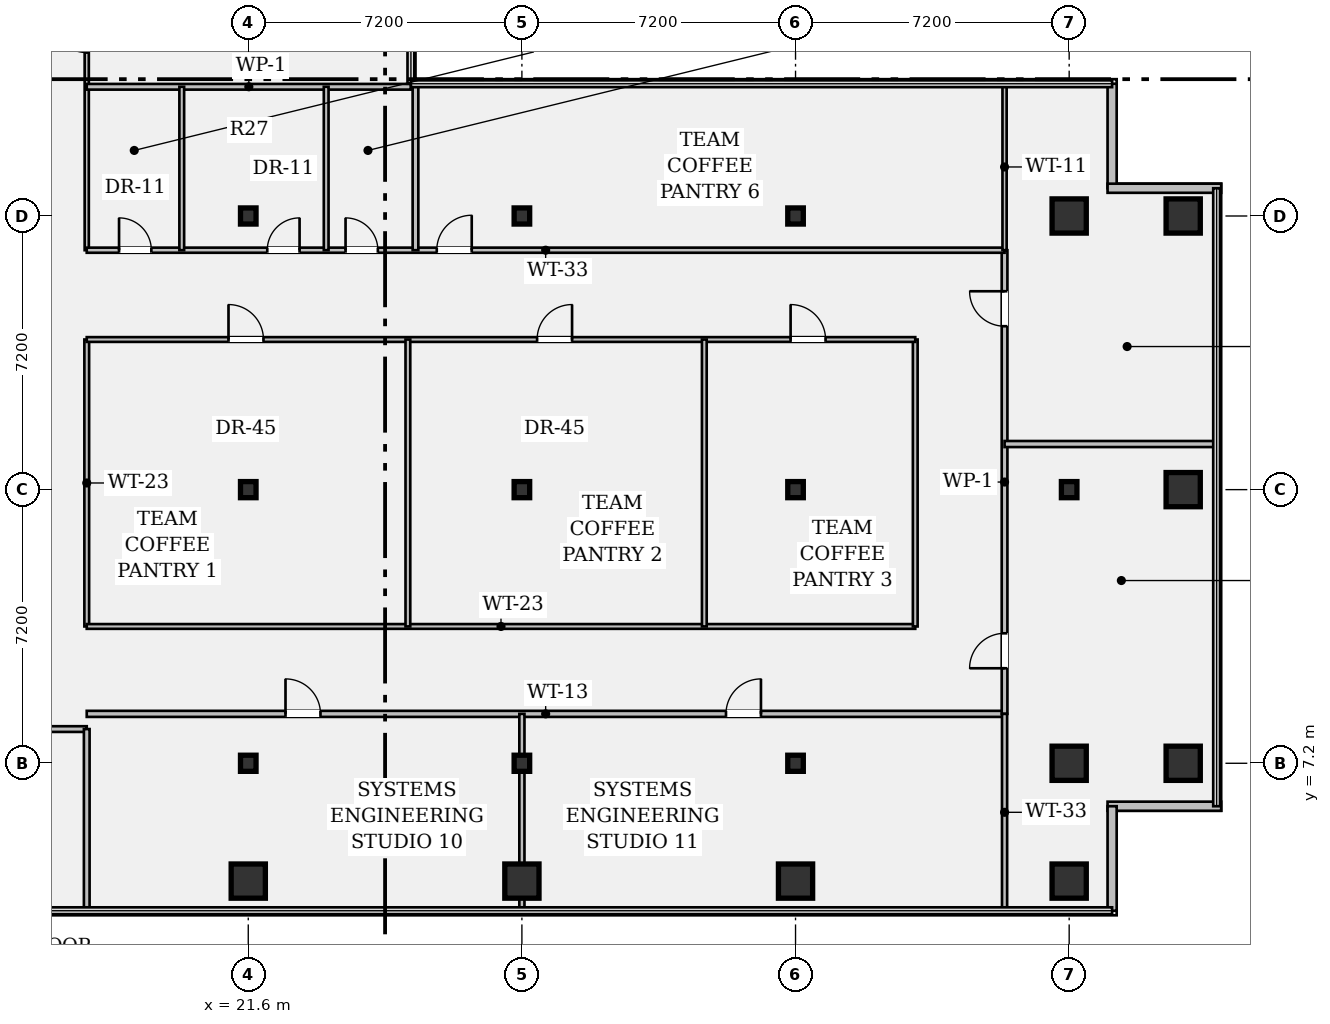
"""IFC4 building model, lengths in metres.
Left out: names, types, materials, properties, quantities, classifications, styles, units other than length and angle.
Written with IfcOpenShell. Run it as: python <this file> out.ifc"""

import sys

from ifc_helpers import new_model, si_unit, direction, frame, frame_2d, origin, origin_2d, place, context, subcontext, project, spatial, rectangle, hollow_rectangle, i_section, extrude, element, fill, save


model = new_model("IFC4")
c1 = context("Model", 3, precision=1e-05, world=origin(), true_north=direction((0.0, 1.0)))
c2 = subcontext(c1, "Body", "Model", "MODEL_VIEW")
j1 = project(units=[si_unit("LENGTHUNIT", "METRE"), si_unit("PLANEANGLEUNIT", "RADIAN")], contexts=[c1])
p1 = place(None, origin())
s1 = spatial("IfcSite", under=j1, at=p1, CompositionType="ELEMENT")
p2 = place(p1, origin())
s2 = spatial("IfcBuilding", under=s1, at=p2, CompositionType="ELEMENT")
p3 = place(p2, frame((0.0, 0.0, 125.3)))
s3 = spatial("IfcBuildingStorey", under=s2, at=p3, CompositionType="ELEMENT", Elevation=125.3)
p4 = place(p3, frame((21.6, 4.1, 0.0), z_axis=(0.0, 0.0, 1.0), x_axis=(1.0, 0.0, 0.0)))
e1 = element("IfcColumn", 1, at=p4, inside=s3, PredefinedType="COLUMN", context=c2, shape_type="SweptSolid", body=[
    extrude(hollow_rectangle(XDim=0.9, YDim=0.9, WallThickness=0.055, at=origin_2d()), origin(), (0.0, 0.0, 1.0), 3.58),
])
for number, where, z_axis, x_axis in (
    (2, (21.6, 7.2, 0.0), (0.0, 0.0, 1.0), (1.0, 0.0, 0.0)),
    (3, (21.6, 14.4, 0.0), (0.0, 0.0, 1.0), (1.0, 0.0, 0.0)),
    (4, (21.6, 21.6, 0.0), (0.0, 0.0, 1.0), (1.0, 0.0, 0.0)),
):
    element("IfcColumn", number, at=place(p3, frame(where, z_axis=z_axis, x_axis=x_axis)), inside=s3, PredefinedType="COLUMN", context=c2, shape_type="SweptSolid", body=[
        extrude(i_section(OverallWidth=0.409, OverallDepth=0.424, WebThickness=0.033, FlangeThickness=0.052, FilletRadius=0.018, at=origin_2d()), origin(), (0.0, 0.0, 1.0), 3.58),
    ])
p5 = place(p3, frame((28.8, 4.1, 0.0), z_axis=(0.0, 0.0, 1.0), x_axis=(1.0, 0.0, 0.0)))
e5 = element("IfcColumn", 5, at=p5, inside=s3, PredefinedType="COLUMN", context=c2, shape_type="SweptSolid", body=[
    extrude(hollow_rectangle(XDim=0.9, YDim=0.9, WallThickness=0.055, at=origin_2d()), origin(), (0.0, 0.0, 1.0), 3.58),
])
for number, where, z_axis, x_axis in (
    (6, (28.8, 7.2, 0.0), (0.0, 0.0, 1.0), (1.0, 0.0, 0.0)),
    (7, (28.8, 14.4, 0.0), (0.0, 0.0, 1.0), (1.0, 0.0, 0.0)),
    (8, (28.8, 21.6, 0.0), (0.0, 0.0, 1.0), (1.0, 0.0, 0.0)),
):
    element("IfcColumn", number, at=place(p3, frame(where, z_axis=z_axis, x_axis=x_axis)), inside=s3, PredefinedType="COLUMN", context=c2, shape_type="SweptSolid", body=[
        extrude(i_section(OverallWidth=0.409, OverallDepth=0.424, WebThickness=0.033, FlangeThickness=0.052, FilletRadius=0.018, at=origin_2d()), origin(), (0.0, 0.0, 1.0), 3.58),
    ])
p6 = place(p3, frame((36.0, 4.1, 0.0), z_axis=(0.0, 0.0, 1.0), x_axis=(1.0, 0.0, 0.0)))
e9 = element("IfcColumn", 9, at=p6, inside=s3, PredefinedType="COLUMN", context=c2, shape_type="SweptSolid", body=[
    extrude(hollow_rectangle(XDim=0.9, YDim=0.9, WallThickness=0.055, at=origin_2d()), origin(), (0.0, 0.0, 1.0), 3.58),
])
for number, where, z_axis, x_axis in (
    (10, (36.0, 7.2, 0.0), (0.0, 0.0, 1.0), (1.0, 0.0, 0.0)),
    (11, (36.0, 14.4, 0.0), (0.0, 0.0, 1.0), (1.0, 0.0, 0.0)),
    (12, (36.0, 21.6, 0.0), (0.0, 0.0, 1.0), (1.0, 0.0, 0.0)),
):
    element("IfcColumn", number, at=place(p3, frame(where, z_axis=z_axis, x_axis=x_axis)), inside=s3, PredefinedType="COLUMN", context=c2, shape_type="SweptSolid", body=[
        extrude(i_section(OverallWidth=0.409, OverallDepth=0.424, WebThickness=0.033, FlangeThickness=0.052, FilletRadius=0.018, at=origin_2d()), origin(), (0.0, 0.0, 1.0), 3.58),
    ])
for number, where, z_axis, x_axis in (
    (13, (43.2, 4.1, 0.0), (0.0, 0.0, 1.0), (1.0, 0.0, 0.0)),
    (14, (43.2, 7.2, 0.0), (0.0, 0.0, 1.0), (1.0, 0.0, 0.0)),
):
    element("IfcColumn", number, at=place(p3, frame(where, z_axis=z_axis, x_axis=x_axis)), inside=s3, PredefinedType="COLUMN", context=c2, shape_type="SweptSolid", body=[
        extrude(hollow_rectangle(XDim=0.9, YDim=0.9, WallThickness=0.055, at=origin_2d()), origin(), (0.0, 0.0, 1.0), 3.58),
    ])
p7 = place(p3, frame((43.2, 14.4, 0.0), z_axis=(0.0, 0.0, 1.0), x_axis=(1.0, 0.0, 0.0)))
e15 = element("IfcColumn", 15, at=p7, inside=s3, PredefinedType="COLUMN", context=c2, shape_type="SweptSolid", body=[
    extrude(i_section(OverallWidth=0.409, OverallDepth=0.424, WebThickness=0.033, FlangeThickness=0.052, FilletRadius=0.018, at=origin_2d()), origin(), (0.0, 0.0, 1.0), 3.58),
])
for number, where, z_axis, x_axis in (
    (16, (43.2, 21.6, 0.0), (0.0, 0.0, 1.0), (1.0, 0.0, 0.0)),
    (17, (46.2, 7.2, 0.0), (0.0, 0.0, 1.0), (1.0, 0.0, 0.0)),
    (18, (46.2, 14.4, 0.0), (0.0, 0.0, 1.0), (1.0, 0.0, 0.0)),
    (19, (46.2, 21.6, 0.0), (0.0, 0.0, 1.0), (1.0, 0.0, 0.0)),
):
    element("IfcColumn", number, at=place(p3, frame(where, z_axis=z_axis, x_axis=x_axis)), inside=s3, PredefinedType="COLUMN", context=c2, shape_type="SweptSolid", body=[
        extrude(hollow_rectangle(XDim=0.9, YDim=0.9, WallThickness=0.055, at=origin_2d()), origin(), (0.0, 0.0, 1.0), 3.58),
    ])
p8 = place(p3, frame((44.33, 25.08, 0.0), z_axis=(0.0, 0.0, 1.0), x_axis=(0.0, -1.0, 0.0)))
e20 = element("IfcWall", 20, at=p8, inside=s3, PredefinedType="STANDARD", context=c2, shape_type="SweptSolid", body=[
    extrude(rectangle(XDim=2.75, YDim=0.24, at=frame_2d((1.375, 0.0))), origin(), (0.0, 0.0, 1.0), 3.58),
])
for number, where, z_axis, x_axis in (
    (21, (44.21, 22.33, 0.0), (0.0, 0.0, 1.0), (1.0, 0.0, 0.0)),
    (22, (47.2, 6.07, 0.0), (0.0, 0.0, 1.0), (-1.0, 0.0, 0.0)),
):
    element("IfcWall", number, at=place(p3, frame(where, z_axis=z_axis, x_axis=x_axis)), inside=s3, PredefinedType="STANDARD", context=c2, shape_type="SweptSolid", body=[
        extrude(rectangle(XDim=2.99, YDim=0.24, at=frame_2d((1.495, 0.0))), origin(), (0.0, 0.0, 1.0), 3.58),
    ])
p9 = place(p3, frame((44.33, 6.07, 0.0), z_axis=(0.0, 0.0, 1.0), x_axis=(0.0, -1.0, 0.0)))
e23 = element("IfcWall", 23, at=p9, inside=s3, PredefinedType="STANDARD", context=c2, shape_type="SweptSolid", body=[
    extrude(rectangle(XDim=2.75, YDim=0.24, at=frame_2d((1.375, 0.0))), origin(), (0.0, 0.0, 1.0), 3.58),
])
p10 = place(p3, frame((14.4, 8.1, 0.0), z_axis=(0.0, 0.0, 1.0), x_axis=(1.0, 0.0, 0.0)))
e24 = element("IfcWall", 24, at=p10, inside=s3, PredefinedType="PARTITIONING", context=c2, shape_type="SweptSolid", body=[
    extrude(rectangle(XDim=2.95, YDim=0.15, at=frame_2d((1.475, 0.0))), origin(), (0.0, 0.0, 1.0), 3.098),
])
p11 = place(p10, frame((0.95, 0.0, 0.0)))
e25 = element("IfcOpeningElement", 25, at=p11, cuts=e24, PredefinedType="OPENING", context=c2, shape_type="SweptSolid", body=[
    extrude(rectangle(XDim=0.92, YDim=2.15, at=frame_2d((0.46, 1.075))), frame((0.0, 0.087, 0.0), z_axis=(0.0, -1.0, 0.0), x_axis=(1.0, 0.0, 0.0)), (0.0, 0.0, 1.0), 0.174),
])
p12 = place(p3, frame((17.35, 20.7, 0.0), z_axis=(0.0, 0.0, 1.0), x_axis=(0.0, 1.0, 0.0)))
e26 = element("IfcWall", 26, at=p12, inside=s3, PredefinedType="PARTITIONING", context=c2, shape_type="SweptSolid", body=[
    extrude(rectangle(XDim=15.2, YDim=0.11, at=frame_2d((7.6, 0.0))), origin(), (0.0, 0.0, 1.0), 2.869),
])
p13 = place(p12, frame((5.2, 0.0, 0.0)))
e27 = element("IfcOpeningElement", 27, at=p13, cuts=e26, PredefinedType="OPENING", context=c2, shape_type="SweptSolid", body=[
    extrude(rectangle(XDim=0.92, YDim=2.15, at=frame_2d((0.46, 1.075))), frame((0.0, 0.067, 0.0), z_axis=(0.0, -1.0, 0.0), x_axis=(1.0, 0.0, 0.0)), (0.0, 0.0, 1.0), 0.134),
])
p14 = place(p12, frame((10.6, 0.0, 0.0)))
e28 = element("IfcOpeningElement", 28, at=p14, cuts=e26, PredefinedType="OPENING", context=c2, shape_type="SweptSolid", body=[
    extrude(rectangle(XDim=1.0, YDim=2.15, at=frame_2d((0.5, 1.075))), frame((0.0, 0.067, 0.0), z_axis=(0.0, -1.0, 0.0), x_axis=(1.0, 0.0, 0.0)), (0.0, 0.0, 1.0), 0.134),
])
p15 = place(p3, frame((17.35, 8.5, 0.0), z_axis=(0.0, 0.0, 1.0), x_axis=(1.0, 0.0, 0.0)))
e29 = element("IfcWall", 29, at=p15, inside=s3, PredefinedType="PARTITIONING", context=c2, shape_type="SweptSolid", body=[
    extrude(rectangle(XDim=24.15, YDim=0.16, at=frame_2d((12.075, 0.0))), origin(), (0.0, 0.0, 1.0), 2.869),
])
p16 = place(p15, frame((5.23, 0.0, 0.0)))
e30 = element("IfcOpeningElement", 30, at=p16, cuts=e29, PredefinedType="OPENING", context=c2, shape_type="SweptSolid", body=[
    extrude(rectangle(XDim=0.92, YDim=2.15, at=frame_2d((0.46, 1.075))), frame((0.0, 0.092, 0.0), z_axis=(0.0, -1.0, 0.0), x_axis=(1.0, 0.0, 0.0)), (0.0, 0.0, 1.0), 0.184),
])
p17 = place(p15, frame((16.82, 0.0, 0.0)))
e31 = element("IfcOpeningElement", 31, at=p17, cuts=e29, PredefinedType="OPENING", context=c2, shape_type="SweptSolid", body=[
    extrude(rectangle(XDim=0.92, YDim=2.15, at=frame_2d((0.46, 1.075))), frame((0.0, 0.092, 0.0), z_axis=(0.0, -1.0, 0.0), x_axis=(1.0, 0.0, 0.0)), (0.0, 0.0, 1.0), 0.184),
])
p18 = place(p3, frame((41.5, 8.5, 0.0), z_axis=(0.0, 0.0, 1.0), x_axis=(0.0, 1.0, 0.0)))
e32 = element("IfcWall", 32, at=p18, inside=s3, PredefinedType="PARTITIONING", context=c2, shape_type="SweptSolid", body=[
    extrude(rectangle(XDim=12.2, YDim=0.15, at=frame_2d((6.1, 0.0))), origin(), (0.0, 0.0, 1.0), 2.869),
])
p19 = place(p18, frame((1.2, 0.0, 0.0)))
e33 = element("IfcOpeningElement", 33, at=p19, cuts=e32, PredefinedType="OPENING", context=c2, shape_type="SweptSolid", body=[
    extrude(rectangle(XDim=0.92, YDim=2.15, at=frame_2d((0.46, 1.075))), frame((0.0, 0.087, 0.0), z_axis=(0.0, -1.0, 0.0), x_axis=(1.0, 0.0, 0.0)), (0.0, 0.0, 1.0), 0.174),
])
p20 = place(p18, frame((10.2, 0.0, 0.0)))
e34 = element("IfcOpeningElement", 34, at=p20, cuts=e32, PredefinedType="OPENING", context=c2, shape_type="SweptSolid", body=[
    extrude(rectangle(XDim=0.92, YDim=2.15, at=frame_2d((0.46, 1.075))), frame((0.0, 0.087, 0.0), z_axis=(0.0, -1.0, 0.0), x_axis=(1.0, 0.0, 0.0)), (0.0, 0.0, 1.0), 0.174),
])
p21 = place(p3, frame((17.35, 20.7, 0.0), z_axis=(0.0, 0.0, 1.0), x_axis=(1.0, 0.0, 0.0)))
e35 = element("IfcWall", 35, at=p21, inside=s3, PredefinedType="PARTITIONING", context=c2, shape_type="SweptSolid", body=[
    extrude(rectangle(XDim=24.15, YDim=0.135, at=frame_2d((12.075, 0.0))), origin(), (0.0, 0.0, 1.0), 2.869),
])
p22 = place(p21, frame((0.85, 0.0, 0.0)))
e36 = element("IfcOpeningElement", 36, at=p22, cuts=e35, PredefinedType="OPENING", context=c2, shape_type="SweptSolid", body=[
    extrude(rectangle(XDim=0.85, YDim=2.15, at=frame_2d((0.425, 1.075))), frame((0.0, 0.08, 0.0), z_axis=(0.0, -1.0, 0.0), x_axis=(1.0, 0.0, 0.0)), (0.0, 0.0, 1.0), 0.159),
])
p23 = place(p21, frame((4.75, 0.0, 0.0)))
e37 = element("IfcOpeningElement", 37, at=p23, cuts=e35, PredefinedType="OPENING", context=c2, shape_type="SweptSolid", body=[
    extrude(rectangle(XDim=0.85, YDim=2.15, at=frame_2d((0.425, 1.075))), frame((0.0, 0.08, 0.0), z_axis=(0.0, -1.0, 0.0), x_axis=(1.0, 0.0, 0.0)), (0.0, 0.0, 1.0), 0.159),
])
p24 = place(p21, frame((6.81, 0.0, 0.0)))
e38 = element("IfcOpeningElement", 38, at=p24, cuts=e35, PredefinedType="OPENING", context=c2, shape_type="SweptSolid", body=[
    extrude(rectangle(XDim=0.85, YDim=2.15, at=frame_2d((0.425, 1.075))), frame((0.0, 0.08, 0.0), z_axis=(0.0, -1.0, 0.0), x_axis=(1.0, 0.0, 0.0)), (0.0, 0.0, 1.0), 0.159),
])
p25 = place(p21, frame((9.21, 0.0, 0.0)))
e39 = element("IfcOpeningElement", 39, at=p25, cuts=e35, PredefinedType="OPENING", context=c2, shape_type="SweptSolid", body=[
    extrude(rectangle(XDim=0.92, YDim=2.15, at=frame_2d((0.46, 1.075))), frame((0.0, 0.08, 0.0), z_axis=(0.0, -1.0, 0.0), x_axis=(1.0, 0.0, 0.0)), (0.0, 0.0, 1.0), 0.159),
])
p26 = place(p3, frame((17.35, 10.8, 0.0), z_axis=(0.0, 0.0, 1.0), x_axis=(0.0, 1.0, 0.0)))
e40 = element("IfcWall", 40, at=p26, inside=s3, PredefinedType="PARTITIONING", context=c2, shape_type="SweptSolid", body=[
    extrude(rectangle(XDim=7.55, YDim=0.125, at=frame_2d((3.775, 0.0))), origin(), (0.0, 0.0, 1.0), 2.869),
])
p27 = place(p3, frame((17.35, 10.8, 0.0), z_axis=(0.0, 0.0, 1.0), x_axis=(1.0, 0.0, 0.0)))
e41 = element("IfcWall", 41, at=p27, inside=s3, PredefinedType="PARTITIONING", context=c2, shape_type="SweptSolid", body=[
    extrude(rectangle(XDim=21.8, YDim=0.125, at=frame_2d((10.9, 0.0))), origin(), (0.0, 0.0, 1.0), 2.869),
])
p28 = place(p3, frame((39.15, 10.8, 0.0), z_axis=(0.0, 0.0, 1.0), x_axis=(0.0, 1.0, 0.0)))
e42 = element("IfcWall", 42, at=p28, inside=s3, PredefinedType="PARTITIONING", context=c2, shape_type="SweptSolid", body=[
    extrude(rectangle(XDim=7.55, YDim=0.125, at=frame_2d((3.775, 0.0))), origin(), (0.0, 0.0, 1.0), 2.869),
])
p29 = place(p3, frame((17.35, 18.35, 0.0), z_axis=(0.0, 0.0, 1.0), x_axis=(1.0, 0.0, 0.0)))
e43 = element("IfcWall", 43, at=p29, inside=s3, PredefinedType="PARTITIONING", context=c2, shape_type="SweptSolid", body=[
    extrude(rectangle(XDim=21.8, YDim=0.125, at=frame_2d((10.9, 0.0))), origin(), (0.0, 0.0, 1.0), 2.869),
])
p30 = place(p29, frame((3.73, 0.0, 0.0)))
e44 = element("IfcOpeningElement", 44, at=p30, cuts=e43, PredefinedType="OPENING", context=c2, shape_type="SweptSolid", body=[
    extrude(rectangle(XDim=0.92, YDim=2.15, at=frame_2d((0.46, 1.075))), frame((0.0, 0.074, 0.0), z_axis=(0.0, -1.0, 0.0), x_axis=(1.0, 0.0, 0.0)), (0.0, 0.0, 1.0), 0.149),
])
p31 = place(p29, frame((11.85, 0.0, 0.0)))
e45 = element("IfcOpeningElement", 45, at=p31, cuts=e43, PredefinedType="OPENING", context=c2, shape_type="SweptSolid", body=[
    extrude(rectangle(XDim=0.92, YDim=2.15, at=frame_2d((0.46, 1.075))), frame((0.0, 0.074, 0.0), z_axis=(0.0, -1.0, 0.0), x_axis=(1.0, 0.0, 0.0)), (0.0, 0.0, 1.0), 0.149),
])
p32 = place(p29, frame((18.52, 0.0, 0.0)))
e46 = element("IfcOpeningElement", 46, at=p32, cuts=e43, PredefinedType="OPENING", context=c2, shape_type="SweptSolid", body=[
    extrude(rectangle(XDim=0.92, YDim=2.15, at=frame_2d((0.46, 1.075))), frame((0.0, 0.074, 0.0), z_axis=(0.0, -1.0, 0.0), x_axis=(1.0, 0.0, 0.0)), (0.0, 0.0, 1.0), 0.149),
])
for number, where, z_axis, x_axis in (
    (47, (25.8, 10.8, 0.0), (0.0, 0.0, 1.0), (0.0, 1.0, 0.0)),
    (48, (33.6, 10.8, 0.0), (0.0, 0.0, 1.0), (0.0, 1.0, 0.0)),
):
    element("IfcWall", number, at=place(p3, frame(where, z_axis=z_axis, x_axis=x_axis)), inside=s3, PredefinedType="PARTITIONING", context=c2, shape_type="SweptSolid", body=[
        extrude(rectangle(XDim=7.55, YDim=0.125, at=frame_2d((3.775, 0.0))), origin(), (0.0, 0.0, 1.0), 2.869),
    ])
p33 = place(p3, frame((17.35, 25.0, 0.0), z_axis=(0.0, 0.0, 1.0), x_axis=(1.0, 0.0, 0.0)))
e49 = element("IfcWall", 49, at=p33, inside=s3, PredefinedType="PARTITIONING", context=c2, shape_type="SweptSolid", body=[
    extrude(rectangle(XDim=8.53, YDim=0.15, at=frame_2d((4.265, 0.0))), origin(), (0.0, 0.0, 1.0), 2.869),
])
for number, where, z_axis, x_axis in (
    (50, (19.85, 20.7, 0.0), (0.0, 0.0, 1.0), (0.0, 1.0, 0.0)),
    (51, (23.65, 20.7, 0.0), (0.0, 0.0, 1.0), (0.0, 1.0, 0.0)),
):
    element("IfcWall", number, at=place(p3, frame(where, z_axis=z_axis, x_axis=x_axis)), inside=s3, PredefinedType="PARTITIONING", context=c2, shape_type="SweptSolid", body=[
        extrude(rectangle(XDim=4.3, YDim=0.125, at=frame_2d((2.15, 0.0))), origin(), (0.0, 0.0, 1.0), 2.869),
    ])
p34 = place(p3, frame((26.0, 20.7, 0.0), z_axis=(0.0, 0.0, 1.0), x_axis=(0.0, 1.0, 0.0)))
e52 = element("IfcWall", 52, at=p34, inside=s3, PredefinedType="PARTITIONING", context=c2, shape_type="SweptSolid", body=[
    extrude(rectangle(XDim=4.38, YDim=0.15, at=frame_2d((2.19, 0.0))), origin(), (0.0, 0.0, 1.0), 2.869),
])
p35 = place(p3, frame((41.5, 3.32, 0.0), z_axis=(0.0, 0.0, 1.0), x_axis=(0.0, 1.0, 0.0)))
e53 = element("IfcWall", 53, at=p35, inside=s3, PredefinedType="PARTITIONING", context=c2, shape_type="SweptSolid", body=[
    extrude(rectangle(XDim=5.18, YDim=0.135, at=frame_2d((2.59, 0.0))), origin(), (0.0, 0.0, 1.0), 2.869),
])
p36 = place(p3, frame((41.5, 20.7, 0.0), z_axis=(0.0, 0.0, 1.0), x_axis=(0.0, 1.0, 0.0)))
e54 = element("IfcWall", 54, at=p36, inside=s3, PredefinedType="PARTITIONING", context=c2, shape_type="SweptSolid", body=[
    extrude(rectangle(XDim=4.38, YDim=0.11, at=frame_2d((2.19, 0.0))), origin(), (0.0, 0.0, 1.0), 2.869),
])
p37 = place(p3, frame((41.5, 15.6, 0.0), z_axis=(0.0, 0.0, 1.0), x_axis=(1.0, 0.0, 0.0)))
e55 = element("IfcWall", 55, at=p37, inside=s3, PredefinedType="PARTITIONING", context=c2, shape_type="SweptSolid", body=[
    extrude(rectangle(XDim=5.58, YDim=0.16, at=frame_2d((2.79, 0.0))), origin(), (0.0, 0.0, 1.0), 2.869),
])
p38 = place(p3, frame((17.35, 3.32, 0.0), z_axis=(0.0, 0.0, 1.0), x_axis=(0.0, 1.0, 0.0)))
e56 = element("IfcWall", 56, at=p38, inside=s3, PredefinedType="PARTITIONING", context=c2, shape_type="SweptSolid", body=[
    extrude(rectangle(XDim=4.78, YDim=0.15, at=frame_2d((2.39, 0.0))), origin(), (0.0, 0.0, 1.0), 2.869),
])
p39 = place(p3, frame((28.8, 3.32, 0.0), z_axis=(0.0, 0.0, 1.0), x_axis=(0.0, 1.0, 0.0)))
e57 = element("IfcWall", 57, at=p39, inside=s3, PredefinedType="PARTITIONING", context=c2, shape_type="SweptSolid", body=[
    extrude(rectangle(XDim=5.18, YDim=0.135, at=frame_2d((2.59, 0.0))), origin(), (0.0, 0.0, 1.0), 2.869),
])
p40 = place(p30, origin())
e58 = element("IfcDoor", 58, at=p40, inside=s3, OperationType="SINGLE_SWING_LEFT", PredefinedType="DOOR", context=c2, shape_type="SweptSolid", body=[
    extrude(rectangle(XDim=0.92, YDim=2.15, at=frame_2d((0.46, 1.075))), frame((0.0, 0.025, 0.0), z_axis=(0.0, -1.0, 0.0), x_axis=(1.0, 0.0, 0.0)), (0.0, 0.0, 1.0), 0.05),
])
fill(e44, e58)
p41 = place(p31, origin())
e59 = element("IfcDoor", 59, at=p41, inside=s3, OperationType="SINGLE_SWING_RIGHT", PredefinedType="DOOR", context=c2, shape_type="SweptSolid", body=[
    extrude(rectangle(XDim=0.92, YDim=2.15, at=frame_2d((0.46, 1.075))), frame((0.0, 0.025, 0.0), z_axis=(0.0, -1.0, 0.0), x_axis=(1.0, 0.0, 0.0)), (0.0, 0.0, 1.0), 0.05),
])
fill(e45, e59)
p42 = place(p32, origin())
e60 = element("IfcDoor", 60, at=p42, inside=s3, OperationType="SINGLE_SWING_LEFT", PredefinedType="DOOR", context=c2, shape_type="SweptSolid", body=[
    extrude(rectangle(XDim=0.92, YDim=2.15, at=frame_2d((0.46, 1.075))), frame((0.0, 0.025, 0.0), z_axis=(0.0, -1.0, 0.0), x_axis=(1.0, 0.0, 0.0)), (0.0, 0.0, 1.0), 0.05),
])
fill(e46, e60)
p43 = place(p22, origin())
e61 = element("IfcDoor", 61, at=p43, inside=s3, OperationType="SINGLE_SWING_LEFT", PredefinedType="DOOR", context=c2, shape_type="SweptSolid", body=[
    extrude(rectangle(XDim=0.85, YDim=2.15, at=frame_2d((0.425, 1.075))), frame((0.0, 0.025, 0.0), z_axis=(0.0, -1.0, 0.0), x_axis=(1.0, 0.0, 0.0)), (0.0, 0.0, 1.0), 0.05),
])
fill(e36, e61)
p44 = place(p23, origin())
e62 = element("IfcDoor", 62, at=p44, inside=s3, OperationType="SINGLE_SWING_RIGHT", PredefinedType="DOOR", context=c2, shape_type="SweptSolid", body=[
    extrude(rectangle(XDim=0.85, YDim=2.15, at=frame_2d((0.425, 1.075))), frame((0.0, 0.025, 0.0), z_axis=(0.0, -1.0, 0.0), x_axis=(1.0, 0.0, 0.0)), (0.0, 0.0, 1.0), 0.05),
])
fill(e37, e62)
p45 = place(p24, origin())
e63 = element("IfcDoor", 63, at=p45, inside=s3, OperationType="SINGLE_SWING_LEFT", PredefinedType="DOOR", context=c2, shape_type="SweptSolid", body=[
    extrude(rectangle(XDim=0.85, YDim=2.15, at=frame_2d((0.425, 1.075))), frame((0.0, 0.025, 0.0), z_axis=(0.0, -1.0, 0.0), x_axis=(1.0, 0.0, 0.0)), (0.0, 0.0, 1.0), 0.05),
])
fill(e38, e63)
p46 = place(p25, origin())
e64 = element("IfcDoor", 64, at=p46, inside=s3, OperationType="SINGLE_SWING_RIGHT", PredefinedType="DOOR", context=c2, shape_type="SweptSolid", body=[
    extrude(rectangle(XDim=0.92, YDim=2.15, at=frame_2d((0.46, 1.075))), frame((0.0, 0.025, 0.0), z_axis=(0.0, -1.0, 0.0), x_axis=(1.0, 0.0, 0.0)), (0.0, 0.0, 1.0), 0.05),
])
fill(e39, e64)
p47 = place(p19, origin())
e65 = element("IfcDoor", 65, at=p47, inside=s3, OperationType="SINGLE_SWING_LEFT", PredefinedType="DOOR", context=c2, shape_type="SweptSolid", body=[
    extrude(rectangle(XDim=0.92, YDim=2.15, at=frame_2d((0.46, 1.075))), frame((0.0, 0.025, 0.0), z_axis=(0.0, -1.0, 0.0), x_axis=(1.0, 0.0, 0.0)), (0.0, 0.0, 1.0), 0.05),
])
fill(e33, e65)
p48 = place(p20, origin())
e66 = element("IfcDoor", 66, at=p48, inside=s3, OperationType="SINGLE_SWING_RIGHT", PredefinedType="DOOR", context=c2, shape_type="SweptSolid", body=[
    extrude(rectangle(XDim=0.92, YDim=2.15, at=frame_2d((0.46, 1.075))), frame((0.0, 0.025, 0.0), z_axis=(0.0, -1.0, 0.0), x_axis=(1.0, 0.0, 0.0)), (0.0, 0.0, 1.0), 0.05),
])
fill(e34, e66)
p49 = place(p16, origin())
e67 = element("IfcDoor", 67, at=p49, inside=s3, OperationType="SINGLE_SWING_LEFT", PredefinedType="DOOR", context=c2, shape_type="SweptSolid", body=[
    extrude(rectangle(XDim=0.92, YDim=2.15, at=frame_2d((0.46, 1.075))), frame((0.0, 0.025, 0.0), z_axis=(0.0, -1.0, 0.0), x_axis=(1.0, 0.0, 0.0)), (0.0, 0.0, 1.0), 0.05),
])
fill(e30, e67)
p50 = place(p17, origin())
e68 = element("IfcDoor", 68, at=p50, inside=s3, OperationType="SINGLE_SWING_RIGHT", PredefinedType="DOOR", context=c2, shape_type="SweptSolid", body=[
    extrude(rectangle(XDim=0.92, YDim=2.15, at=frame_2d((0.46, 1.075))), frame((0.0, 0.025, 0.0), z_axis=(0.0, -1.0, 0.0), x_axis=(1.0, 0.0, 0.0)), (0.0, 0.0, 1.0), 0.05),
])
fill(e31, e68)
save(model, sys.argv[1])
